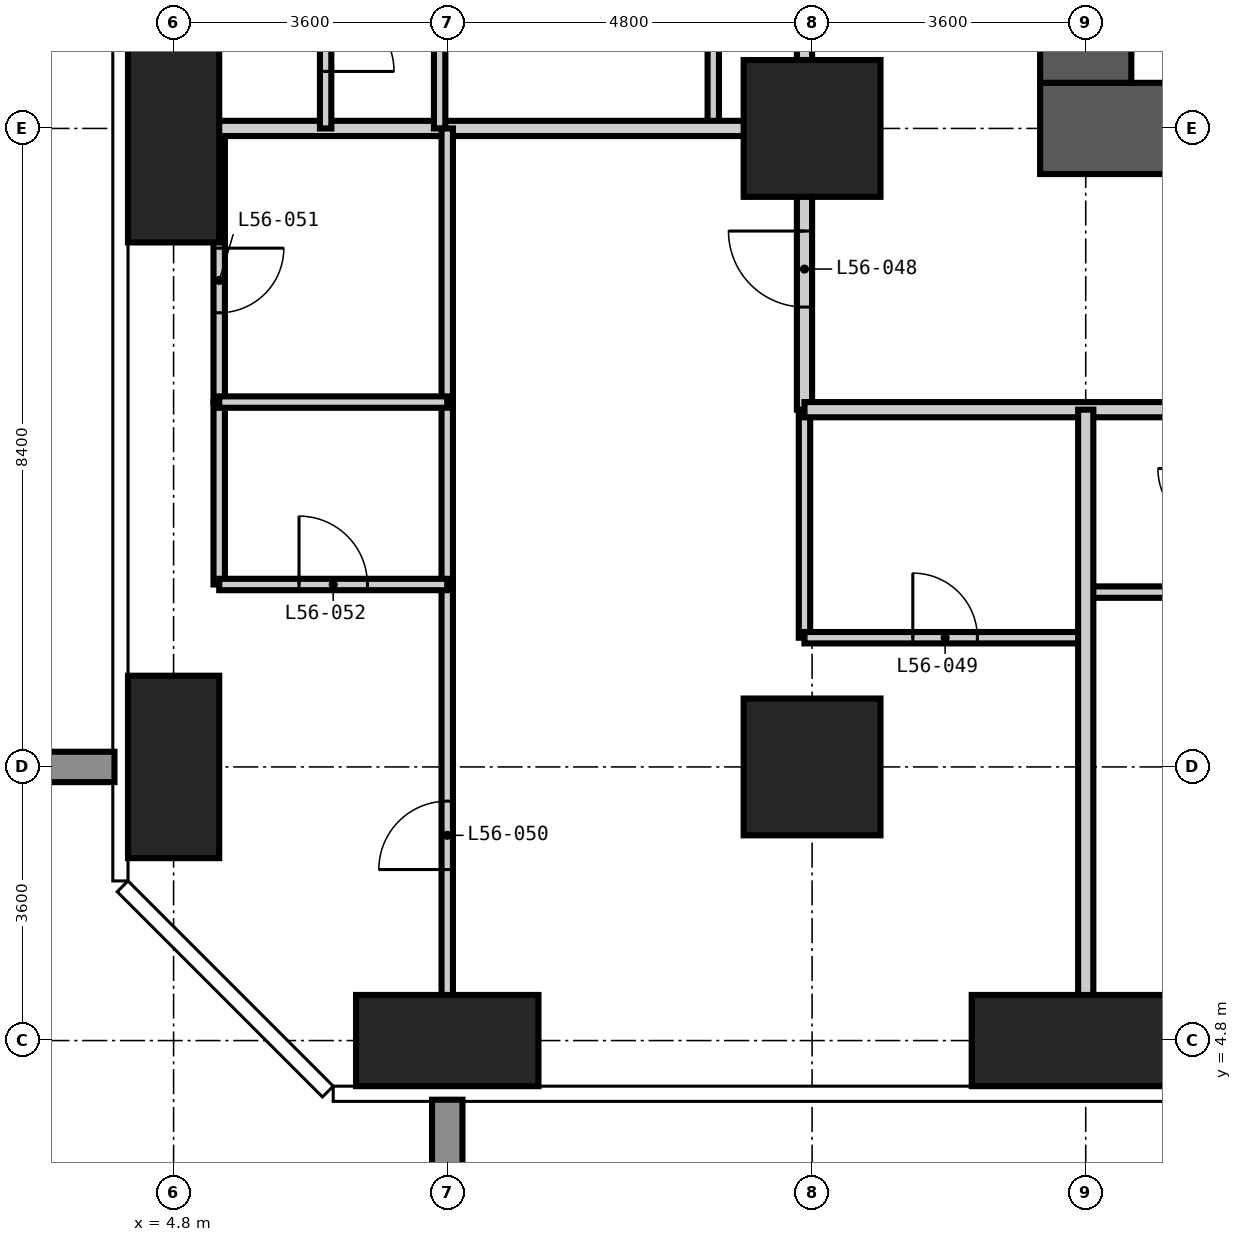
"""IFC4 building model, lengths in metres.
Left out: names, types, materials, properties, quantities, classifications, styles, units other than length and angle.
Written with IfcOpenShell. Run it as: python <this file> out.ifc"""

import sys

from ifc_helpers import new_model, si_unit, direction, frame, frame_2d, origin, origin_2d, place, context, subcontext, project, spatial, rectangle, extrude, element, fill, save


model = new_model("IFC4")
c1 = context("Model", 3, precision=1e-05, world=origin(), true_north=direction((0.0, 1.0)))
c2 = subcontext(c1, "Body", "Model", "MODEL_VIEW")
j1 = project(units=[si_unit("LENGTHUNIT", "METRE"), si_unit("PLANEANGLEUNIT", "RADIAN")], contexts=[c1])
p1 = place(None, origin())
s1 = spatial("IfcSite", under=j1, at=p1, CompositionType="ELEMENT")
p2 = place(p1, origin())
s2 = spatial("IfcBuilding", under=s1, at=p2, CompositionType="ELEMENT")
p3 = place(p2, frame((0.0, 0.0, 216.6)))
s3 = spatial("IfcBuildingStorey", under=s2, at=p3, CompositionType="ELEMENT", Elevation=216.6)
p4 = place(p3, frame((4.8, 8.4, -0.35), z_axis=(0.0, 0.0, 1.0), x_axis=(1.0, 0.0, 0.0)))
e1 = element("IfcColumn", 1, at=p4, inside=s3, PredefinedType="COLUMN", context=c2, shape_type="SweptSolid", body=[
    extrude(rectangle(XDim=1.2, YDim=2.4, at=origin_2d()), origin(), (0.0, 0.0, 1.0), 3.55),
])
p5 = place(p3, frame((4.8, 16.8, -0.35), z_axis=(0.0, 0.0, 1.0), x_axis=(1.0, 0.0, 0.0)))
e2 = element("IfcColumn", 2, at=p5, inside=s3, PredefinedType="COLUMN", context=c2, shape_type="SweptSolid", body=[
    extrude(rectangle(XDim=1.2, YDim=3.0, at=origin_2d()), origin(), (0.0, 0.0, 1.0), 3.55),
])
p6 = place(p3, frame((8.4, 4.8, -0.35), z_axis=(0.0, 0.0, 1.0), x_axis=(1.0, 0.0, 0.0)))
e3 = element("IfcColumn", 3, at=p6, inside=s3, PredefinedType="COLUMN", context=c2, shape_type="SweptSolid", body=[
    extrude(rectangle(XDim=2.4, YDim=1.2, at=origin_2d()), origin(), (0.0, 0.0, 1.0), 3.55),
])
for number, where, z_axis, x_axis in (
    (4, (13.2, 8.4, -0.35), (0.0, 0.0, 1.0), (1.0, 0.0, 0.0)),
    (5, (13.2, 16.8, -0.35), (0.0, 0.0, 1.0), (1.0, 0.0, 0.0)),
):
    element("IfcColumn", number, at=place(p3, frame(where, z_axis=z_axis, x_axis=x_axis)), inside=s3, PredefinedType="COLUMN", context=c2, shape_type="SweptSolid", body=[
        extrude(rectangle(XDim=1.8, YDim=1.8, at=origin_2d()), origin(), (0.0, 0.0, 1.0), 3.55),
    ])
p7 = place(p3, frame((16.8, 4.8, -0.35), z_axis=(0.0, 0.0, 1.0), x_axis=(1.0, 0.0, 0.0)))
e6 = element("IfcColumn", 6, at=p7, inside=s3, PredefinedType="COLUMN", context=c2, shape_type="SweptSolid", body=[
    extrude(rectangle(XDim=3.0, YDim=1.2, at=origin_2d()), origin(), (0.0, 0.0, 1.0), 3.55),
])
p8 = place(p3, frame((16.2, 16.8, -0.35), z_axis=(0.0, 0.0, 1.0), x_axis=(1.0, 0.0, 0.0)))
e7 = element("IfcWall", 7, at=p8, inside=s3, PredefinedType="SHEAR", context=c2, shape_type="SweptSolid", body=[
    extrude(rectangle(XDim=26.4, YDim=1.2, at=frame_2d((13.2, 0.0))), origin(), (0.0, 0.0, 1.0), 3.55),
])
p9 = place(p8, frame((12.7, 0.0, 0.35)))
e8 = element("IfcOpeningElement", 8, at=p9, cuts=e7, PredefinedType="OPENING", context=c2, shape_type="SweptSolid", body=[
    extrude(rectangle(XDim=1.0, YDim=2.1, at=frame_2d((0.5, 1.05))), frame((0.0, 0.61, 0.0), z_axis=(0.0, -1.0, 0.0), x_axis=(1.0, 0.0, 0.0)), (0.0, 0.0, 1.0), 1.22),
])
p10 = place(p8, frame((19.0, 0.0, 0.35)))
e9 = element("IfcOpeningElement", 9, at=p10, cuts=e7, PredefinedType="OPENING", context=c2, shape_type="SweptSolid", body=[
    extrude(rectangle(XDim=1.0, YDim=2.1, at=frame_2d((0.5, 1.05))), frame((0.0, 0.61, 0.0), z_axis=(0.0, -1.0, 0.0), x_axis=(1.0, 0.0, 0.0)), (0.0, 0.0, 1.0), 1.22),
])
p11 = place(p3, frame((16.8, 41.4, -0.35), z_axis=(0.0, 0.0, 1.0), x_axis=(0.0, -1.0, 0.0)))
e10 = element("IfcWall", 10, at=p11, inside=s3, PredefinedType="SHEAR", context=c2, shape_type="SweptSolid", body=[
    extrude(rectangle(XDim=24.0, YDim=1.2, at=frame_2d((12.0, 0.0))), origin(), (0.0, 0.0, 1.0), 3.55),
])
p12 = place(p11, frame((11.1, 0.0, 0.35)))
e11 = element("IfcOpeningElement", 11, at=p12, cuts=e10, PredefinedType="OPENING", context=c2, shape_type="SweptSolid", body=[
    extrude(rectangle(XDim=1.8, YDim=2.2, at=frame_2d((0.9, 1.1))), frame((0.0, 0.61, 0.0), z_axis=(0.0, -1.0, 0.0), x_axis=(1.0, 0.0, 0.0)), (0.0, 0.0, 1.0), 1.22),
])
p13 = place(p11, frame((19.9, 0.0, 0.35)))
e12 = element("IfcOpeningElement", 12, at=p13, cuts=e10, PredefinedType="OPENING", context=c2, shape_type="SweptSolid", body=[
    extrude(rectangle(XDim=1.0, YDim=2.1, at=frame_2d((0.5, 1.05))), frame((0.0, 0.61, 0.0), z_axis=(0.0, -1.0, 0.0), x_axis=(1.0, 0.0, 0.0)), (0.0, 0.0, 1.0), 1.22),
])
p14 = place(p11, frame((5.2, 0.0, 0.35)))
e13 = element("IfcOpeningElement", 13, at=p14, cuts=e10, PredefinedType="OPENING", context=c2, shape_type="SweptSolid", body=[
    extrude(rectangle(XDim=1.0, YDim=2.1, at=frame_2d((0.5, 1.05))), frame((0.0, 0.61, 0.0), z_axis=(0.0, -1.0, 0.0), x_axis=(1.0, 0.0, 0.0)), (0.0, 0.0, 1.0), 1.22),
])
p15 = place(p3, frame((5.4, 13.2, 0.0), z_axis=(0.0, 0.0, 1.0), x_axis=(0.0, 1.0, 0.0)))
e14 = element("IfcWall", 14, at=p15, inside=s3, PredefinedType="PARTITIONING", context=c2, shape_type="SweptSolid", body=[
    extrude(rectangle(XDim=3.6, YDim=0.15, at=frame_2d((1.8, 0.0))), origin(), (0.0, 0.0, 1.0), 3.2),
])
p16 = place(p15, frame((1.175, 0.0, 0.0)))
e15 = element("IfcOpeningElement", 15, at=p16, cuts=e14, PredefinedType="OPENING", context=c2, shape_type="SweptSolid", body=[
    extrude(rectangle(XDim=0.85, YDim=2.1, at=frame_2d((0.425, 1.05))), frame((0.0, 0.085, 0.0), z_axis=(0.0, -1.0, 0.0), x_axis=(1.0, 0.0, 0.0)), (0.0, 0.0, 1.0), 0.17),
])
p17 = place(p3, frame((11.9, 16.8, 0.0), z_axis=(0.0, 0.0, 1.0), x_axis=(0.0, 1.0, 0.0)))
e16 = element("IfcWall", 16, at=p17, inside=s3, PredefinedType="PARTITIONING", context=c2, shape_type="SweptSolid", body=[
    extrude(rectangle(XDim=2.4, YDim=0.15, at=frame_2d((1.2, 0.0))), origin(), (0.0, 0.0, 1.0), 3.2),
])
p18 = place(p3, frame((13.1, 10.1, 0.0), z_axis=(0.0, 0.0, 1.0), x_axis=(0.0, 1.0, 0.0)))
e17 = element("IfcWall", 17, at=p18, inside=s3, PredefinedType="PARTITIONING", context=c2, shape_type="SweptSolid", body=[
    extrude(rectangle(XDim=3.0, YDim=0.15, at=frame_2d((1.5, 0.0))), origin(), (0.0, 0.0, 1.0), 3.2),
])
p19 = place(p3, frame((13.1, 10.1, 0.0), z_axis=(0.0, 0.0, 1.0), x_axis=(1.0, 0.0, 0.0)))
e18 = element("IfcWall", 18, at=p19, inside=s3, PredefinedType="PARTITIONING", context=c2, shape_type="SweptSolid", body=[
    extrude(rectangle(XDim=3.7, YDim=0.15, at=frame_2d((1.85, 0.0))), origin(), (0.0, 0.0, 1.0), 3.2),
])
p20 = place(p19, frame((1.425, 0.0, 0.0)))
e19 = element("IfcOpeningElement", 19, at=p20, cuts=e18, PredefinedType="OPENING", context=c2, shape_type="SweptSolid", body=[
    extrude(rectangle(XDim=0.85, YDim=2.1, at=frame_2d((0.425, 1.05))), frame((0.0, 0.085, 0.0), z_axis=(0.0, -1.0, 0.0), x_axis=(1.0, 0.0, 0.0)), (0.0, 0.0, 1.0), 0.17),
])
p21 = place(p3, frame((16.8, 10.7, 0.0), z_axis=(0.0, 0.0, 1.0), x_axis=(1.0, 0.0, 0.0)))
e20 = element("IfcWall", 20, at=p21, inside=s3, PredefinedType="PARTITIONING", context=c2, shape_type="SweptSolid", body=[
    extrude(rectangle(XDim=1.8, YDim=0.15, at=frame_2d((0.9, 0.0))), origin(), (0.0, 0.0, 1.0), 3.2),
])
p22 = place(p3, frame((13.1, 13.1, 0.0), z_axis=(0.0, 0.0, 1.0), x_axis=(0.0, 1.0, 0.0)))
e21 = element("IfcWall", 21, at=p22, inside=s3, PredefinedType="PARTITIONING", context=c2, shape_type="SweptSolid", body=[
    extrude(rectangle(XDim=32.0, YDim=0.2, at=frame_2d((16.0, 0.0))), origin(), (0.0, 0.0, 1.0), 3.2),
])
p23 = place(p22, frame((5.3, 0.0, 0.0)))
e22 = element("IfcOpeningElement", 22, at=p23, cuts=e21, PredefinedType="OPENING", context=c2, shape_type="SweptSolid", body=[
    extrude(rectangle(XDim=1.0, YDim=2.2, at=frame_2d((0.5, 1.1))), frame((0.0, 0.11, 0.0), z_axis=(0.0, -1.0, 0.0), x_axis=(1.0, 0.0, 0.0)), (0.0, 0.0, 1.0), 0.22),
])
p24 = place(p22, frame((13.1, 0.0, 0.0)))
e23 = element("IfcOpeningElement", 23, at=p24, cuts=e21, PredefinedType="OPENING", context=c2, shape_type="SweptSolid", body=[
    extrude(rectangle(XDim=1.0, YDim=2.2, at=frame_2d((0.5, 1.1))), frame((0.0, 0.11, 0.0), z_axis=(0.0, -1.0, 0.0), x_axis=(1.0, 0.0, 0.0)), (0.0, 0.0, 1.0), 0.22),
])
p25 = place(p22, frame((18.5, 0.0, 0.0)))
e24 = element("IfcOpeningElement", 24, at=p25, cuts=e21, PredefinedType="OPENING", context=c2, shape_type="SweptSolid", body=[
    extrude(rectangle(XDim=1.0, YDim=2.2, at=frame_2d((0.5, 1.1))), frame((0.0, 0.11, 0.0), z_axis=(0.0, -1.0, 0.0), x_axis=(1.0, 0.0, 0.0)), (0.0, 0.0, 1.0), 0.22),
])
p26 = place(p22, frame((26.3, 0.0, 0.0)))
e25 = element("IfcOpeningElement", 25, at=p26, cuts=e21, PredefinedType="OPENING", context=c2, shape_type="SweptSolid", body=[
    extrude(rectangle(XDim=1.0, YDim=2.2, at=frame_2d((0.5, 1.1))), frame((0.0, 0.11, 0.0), z_axis=(0.0, -1.0, 0.0), x_axis=(1.0, 0.0, 0.0)), (0.0, 0.0, 1.0), 0.22),
])
p27 = place(p22, frame((1.35, 0.0, 0.0)))
e26 = element("IfcOpeningElement", 26, at=p27, cuts=e21, PredefinedType="OPENING", context=c2, shape_type="SweptSolid", body=[
    extrude(rectangle(XDim=1.0, YDim=2.2, at=frame_2d((0.5, 1.1))), frame((0.0, 0.11, 0.0), z_axis=(0.0, -1.0, 0.0), x_axis=(1.0, 0.0, 0.0)), (0.0, 0.0, 1.0), 0.22),
])
p28 = place(p22, frame((29.95, 0.0, 0.0)))
e27 = element("IfcOpeningElement", 27, at=p28, cuts=e21, PredefinedType="OPENING", context=c2, shape_type="SweptSolid", body=[
    extrude(rectangle(XDim=1.0, YDim=2.2, at=frame_2d((0.5, 1.1))), frame((0.0, 0.11, 0.0), z_axis=(0.0, -1.0, 0.0), x_axis=(1.0, 0.0, 0.0)), (0.0, 0.0, 1.0), 0.22),
])
p29 = place(p3, frame((44.5, 13.1, 0.0), z_axis=(0.0, 0.0, 1.0), x_axis=(-1.0, 0.0, 0.0)))
e28 = element("IfcWall", 28, at=p29, inside=s3, PredefinedType="PARTITIONING", context=c2, shape_type="SweptSolid", body=[
    extrude(rectangle(XDim=31.4, YDim=0.2, at=frame_2d((15.7, 0.0))), origin(), (0.0, 0.0, 1.0), 3.2),
])
p30 = place(p29, frame((24.2, 0.0, 0.0)))
e29 = element("IfcOpeningElement", 29, at=p30, cuts=e28, PredefinedType="OPENING", context=c2, shape_type="SweptSolid", body=[
    extrude(rectangle(XDim=1.0, YDim=2.2, at=frame_2d((0.5, 1.1))), frame((0.0, 0.11, 0.0), z_axis=(0.0, -1.0, 0.0), x_axis=(1.0, 0.0, 0.0)), (0.0, 0.0, 1.0), 0.22),
])
p31 = place(p29, frame((13.4, 0.0, 0.0)))
e30 = element("IfcOpeningElement", 30, at=p31, cuts=e28, PredefinedType="OPENING", context=c2, shape_type="SweptSolid", body=[
    extrude(rectangle(XDim=1.0, YDim=2.2, at=frame_2d((0.5, 1.1))), frame((0.0, 0.11, 0.0), z_axis=(0.0, -1.0, 0.0), x_axis=(1.0, 0.0, 0.0)), (0.0, 0.0, 1.0), 0.22),
])
p32 = place(p29, frame((7.4, 0.0, 0.0)))
e31 = element("IfcOpeningElement", 31, at=p32, cuts=e28, PredefinedType="OPENING", context=c2, shape_type="SweptSolid", body=[
    extrude(rectangle(XDim=1.0, YDim=2.2, at=frame_2d((0.5, 1.1))), frame((0.0, 0.11, 0.0), z_axis=(0.0, -1.0, 0.0), x_axis=(1.0, 0.0, 0.0)), (0.0, 0.0, 1.0), 0.22),
])
for number, where, z_axis, x_axis in (
    (32, (16.8, 4.182, 0.0), (0.0, 0.0, 1.0), (0.0, 1.0, 0.0)),
    (33, (4.182, 16.8, 0.0), (0.0, 0.0, 1.0), (1.0, 0.0, 0.0)),
):
    element("IfcWall", number, at=place(p3, frame(where, z_axis=z_axis, x_axis=x_axis)), inside=s3, PredefinedType="PARTITIONING", context=c2, shape_type="SweptSolid", body=[
        extrude(rectangle(XDim=8.918, YDim=0.2, at=frame_2d((4.459, 0.0))), origin(), (0.0, 0.0, 1.0), 3.2),
    ])
p33 = place(p3, frame((5.4, 10.8, 0.0), z_axis=(0.0, 0.0, 1.0), x_axis=(0.0, 1.0, 0.0)))
e34 = element("IfcWall", 34, at=p33, inside=s3, PredefinedType="PARTITIONING", context=c2, shape_type="SweptSolid", body=[
    extrude(rectangle(XDim=2.4, YDim=0.15, at=frame_2d((1.2, 0.0))), origin(), (0.0, 0.0, 1.0), 3.2),
])
p34 = place(p3, frame((6.8, 16.8, 0.0), z_axis=(0.0, 0.0, 1.0), x_axis=(0.0, 1.0, 0.0)))
e35 = element("IfcWall", 35, at=p34, inside=s3, PredefinedType="PARTITIONING", context=c2, shape_type="SweptSolid", body=[
    extrude(rectangle(XDim=2.4, YDim=0.15, at=frame_2d((1.2, 0.0))), origin(), (0.0, 0.0, 1.0), 3.2),
])
p35 = place(p34, frame((0.75, 0.0, 0.0)))
e36 = element("IfcOpeningElement", 36, at=p35, cuts=e35, PredefinedType="OPENING", context=c2, shape_type="SweptSolid", body=[
    extrude(rectangle(XDim=0.9, YDim=2.1, at=frame_2d((0.45, 1.05))), frame((0.0, 0.085, 0.0), z_axis=(0.0, -1.0, 0.0), x_axis=(1.0, 0.0, 0.0)), (0.0, 0.0, 1.0), 0.17),
])
p36 = place(p3, frame((8.3, 16.8, 0.0), z_axis=(0.0, 0.0, 1.0), x_axis=(0.0, 1.0, 0.0)))
e37 = element("IfcWall", 37, at=p36, inside=s3, PredefinedType="PARTITIONING", context=c2, shape_type="SweptSolid", body=[
    extrude(rectangle(XDim=2.4, YDim=0.15, at=frame_2d((1.2, 0.0))), origin(), (0.0, 0.0, 1.0), 3.2),
])
p37 = place(p3, frame((8.4, 4.182, 0.0), z_axis=(0.0, 0.0, 1.0), x_axis=(0.0, 1.0, 0.0)))
e38 = element("IfcWall", 38, at=p37, inside=s3, PredefinedType="PARTITIONING", context=c2, shape_type="SweptSolid", body=[
    extrude(rectangle(XDim=12.618, YDim=0.15, at=frame_2d((6.309, 0.0))), origin(), (0.0, 0.0, 1.0), 3.2),
])
p38 = place(p37, frame((2.868, 0.0, 0.0)))
e39 = element("IfcOpeningElement", 39, at=p38, cuts=e38, PredefinedType="OPENING", context=c2, shape_type="SweptSolid", body=[
    extrude(rectangle(XDim=0.9, YDim=2.1, at=frame_2d((0.45, 1.05))), frame((0.0, 0.085, 0.0), z_axis=(0.0, -1.0, 0.0), x_axis=(1.0, 0.0, 0.0)), (0.0, 0.0, 1.0), 0.17),
])
p39 = place(p3, frame((5.4, 10.8, 0.0), z_axis=(0.0, 0.0, 1.0), x_axis=(1.0, 0.0, 0.0)))
e40 = element("IfcWall", 40, at=p39, inside=s3, PredefinedType="PARTITIONING", context=c2, shape_type="SweptSolid", body=[
    extrude(rectangle(XDim=3.0, YDim=0.15, at=frame_2d((1.5, 0.0))), origin(), (0.0, 0.0, 1.0), 3.2),
])
p40 = place(p39, frame((1.05, 0.0, 0.0)))
e41 = element("IfcOpeningElement", 41, at=p40, cuts=e40, PredefinedType="OPENING", context=c2, shape_type="SweptSolid", body=[
    extrude(rectangle(XDim=0.9, YDim=2.1, at=frame_2d((0.45, 1.05))), frame((0.0, 0.085, 0.0), z_axis=(0.0, -1.0, 0.0), x_axis=(1.0, 0.0, 0.0)), (0.0, 0.0, 1.0), 0.17),
])
p41 = place(p3, frame((5.4, 13.2, 0.0), z_axis=(0.0, 0.0, 1.0), x_axis=(1.0, 0.0, 0.0)))
e42 = element("IfcWall", 42, at=p41, inside=s3, PredefinedType="PARTITIONING", context=c2, shape_type="SweptSolid", body=[
    extrude(rectangle(XDim=3.0, YDim=0.15, at=frame_2d((1.5, 0.0))), origin(), (0.0, 0.0, 1.0), 3.2),
])
p42 = place(p35, frame((0.9, 0.0, 0.0), z_axis=(0.0, 0.0, 1.0), x_axis=(-1.0, 0.0, 0.0)))
e43 = element("IfcDoor", 43, at=p42, inside=s3, OperationType="SINGLE_SWING_RIGHT", PredefinedType="DOOR", context=c2, shape_type="SweptSolid", body=[
    extrude(rectangle(XDim=0.9, YDim=2.1, at=frame_2d((0.45, 1.05))), frame((0.0, 0.025, 0.0), z_axis=(0.0, -1.0, 0.0), x_axis=(1.0, 0.0, 0.0)), (0.0, 0.0, 1.0), 0.05),
])
fill(e36, e43)
p43 = place(p27, origin())
e44 = element("IfcDoor", 44, at=p43, inside=s3, OperationType="SINGLE_SWING_RIGHT", PredefinedType="DOOR", context=c2, shape_type="SweptSolid", body=[
    extrude(rectangle(XDim=1.0, YDim=2.2, at=frame_2d((0.5, 1.1))), frame((0.0, 0.025, 0.0), z_axis=(0.0, -1.0, 0.0), x_axis=(1.0, 0.0, 0.0)), (0.0, 0.0, 1.0), 0.05),
])
fill(e26, e44)
p44 = place(p20, origin())
e45 = element("IfcDoor", 45, at=p44, inside=s3, OperationType="SINGLE_SWING_LEFT", PredefinedType="DOOR", context=c2, shape_type="SweptSolid", body=[
    extrude(rectangle(XDim=0.85, YDim=2.1, at=frame_2d((0.425, 1.05))), frame((0.0, 0.025, 0.0), z_axis=(0.0, -1.0, 0.0), x_axis=(1.0, 0.0, 0.0)), (0.0, 0.0, 1.0), 0.05),
])
fill(e19, e45)
p45 = place(p38, origin())
e46 = element("IfcDoor", 46, at=p45, inside=s3, OperationType="SINGLE_SWING_LEFT", PredefinedType="DOOR", context=c2, shape_type="SweptSolid", body=[
    extrude(rectangle(XDim=0.9, YDim=2.1, at=frame_2d((0.45, 1.05))), frame((0.0, 0.025, 0.0), z_axis=(0.0, -1.0, 0.0), x_axis=(1.0, 0.0, 0.0)), (0.0, 0.0, 1.0), 0.05),
])
fill(e39, e46)
p46 = place(p16, frame((0.85, 0.0, 0.0), z_axis=(0.0, 0.0, 1.0), x_axis=(-1.0, 0.0, 0.0)))
e47 = element("IfcDoor", 47, at=p46, inside=s3, OperationType="SINGLE_SWING_LEFT", PredefinedType="DOOR", context=c2, shape_type="SweptSolid", body=[
    extrude(rectangle(XDim=0.85, YDim=2.1, at=frame_2d((0.425, 1.05))), frame((0.0, 0.025, 0.0), z_axis=(0.0, -1.0, 0.0), x_axis=(1.0, 0.0, 0.0)), (0.0, 0.0, 1.0), 0.05),
])
fill(e15, e47)
p47 = place(p40, origin())
e48 = element("IfcDoor", 48, at=p47, inside=s3, OperationType="SINGLE_SWING_LEFT", PredefinedType="DOOR", context=c2, shape_type="SweptSolid", body=[
    extrude(rectangle(XDim=0.9, YDim=2.1, at=frame_2d((0.45, 1.05))), frame((0.0, 0.025, 0.0), z_axis=(0.0, -1.0, 0.0), x_axis=(1.0, 0.0, 0.0)), (0.0, 0.0, 1.0), 0.05),
])
fill(e41, e48)
save(model, sys.argv[1])
